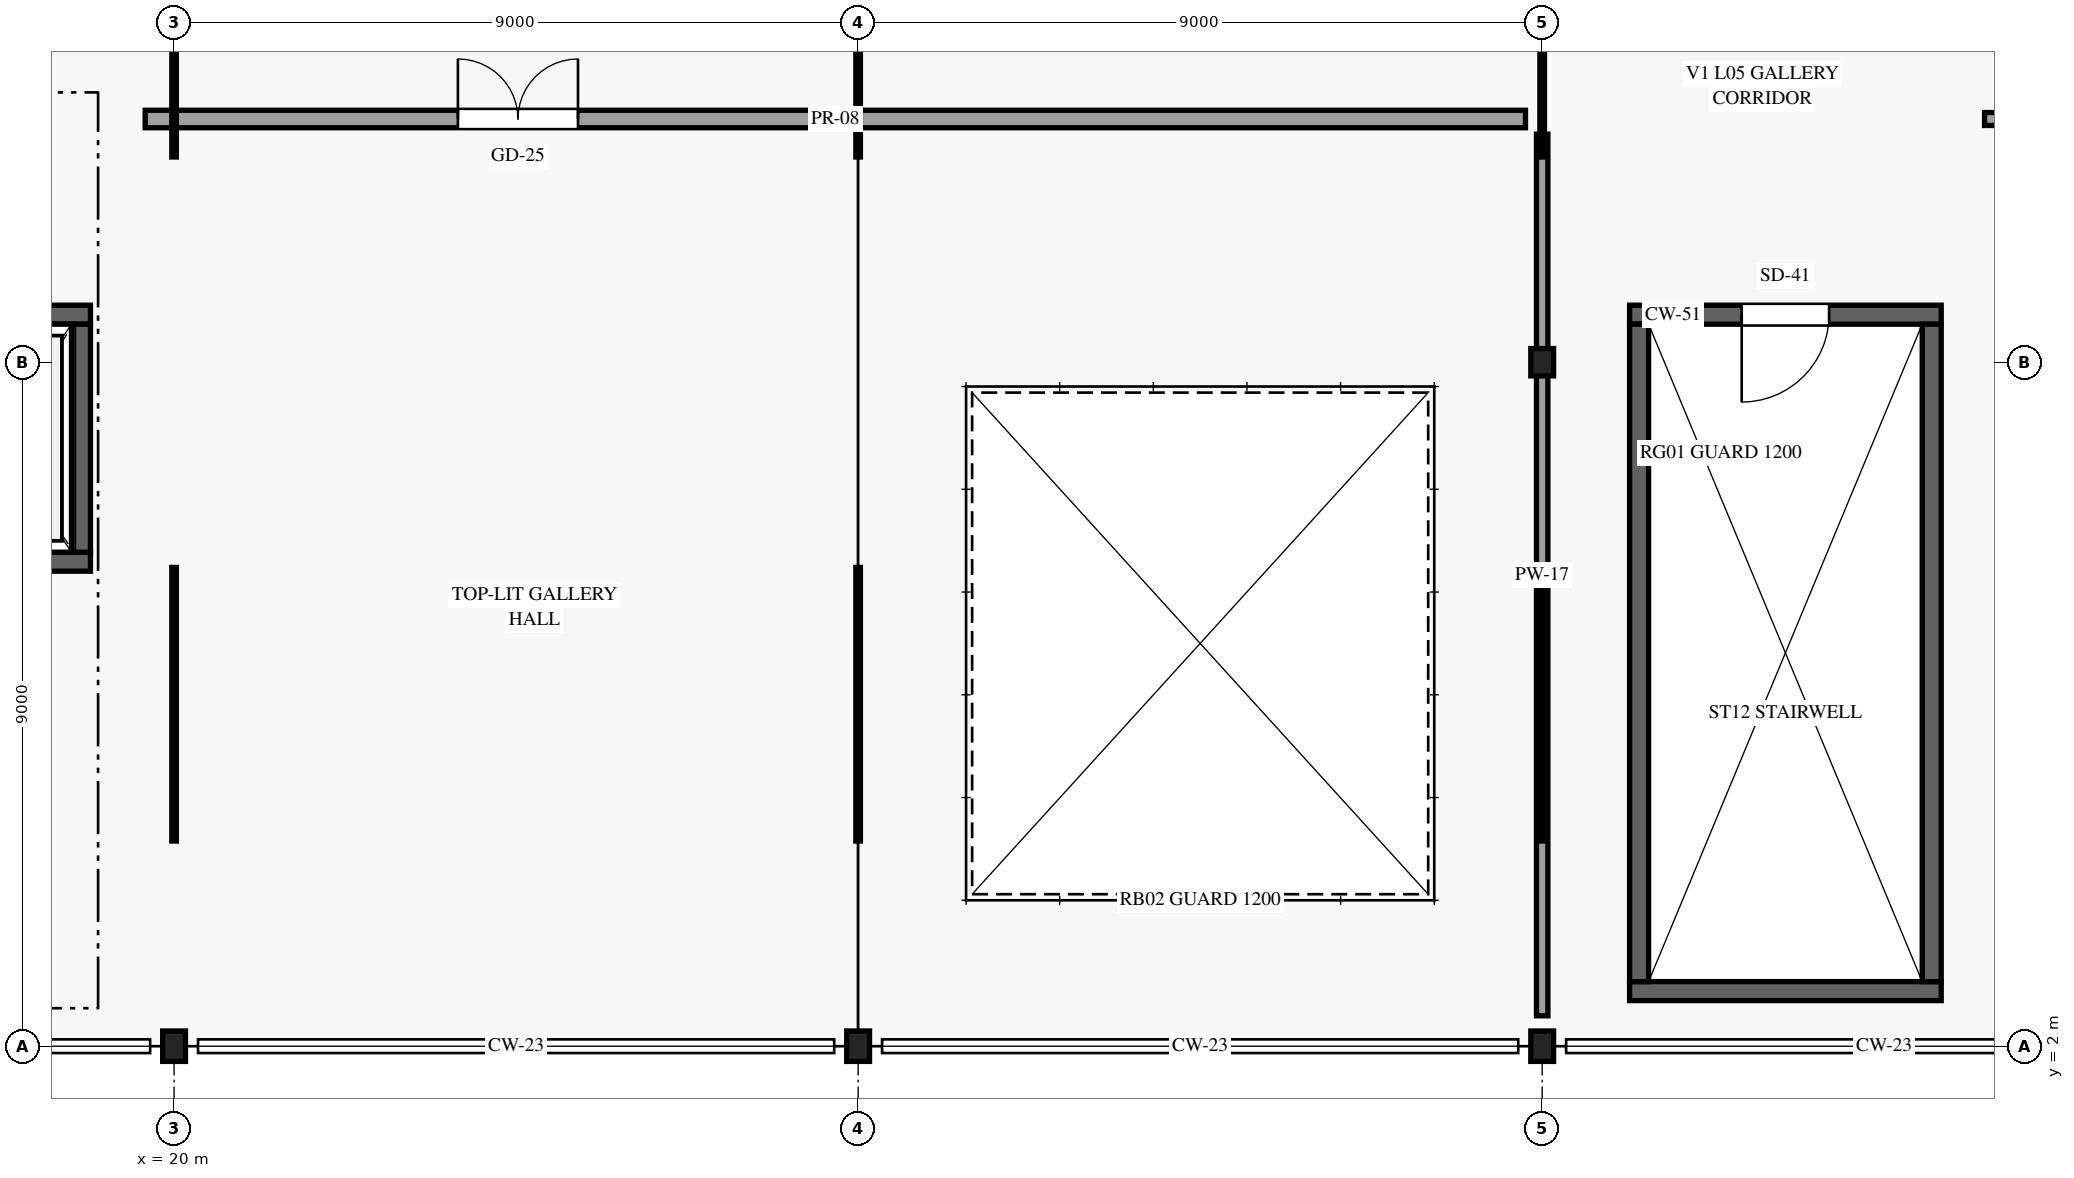
"""IFC4 building model, lengths in metres.
Left out: names, types, materials, properties, quantities, classifications, styles, units other than length and angle.
Written with IfcOpenShell. Run it as: python <this file> out.ifc"""

import sys

from ifc_helpers import new_model, si_unit, direction, frame, frame_2d, origin, origin_2d, place, context, subcontext, project, spatial, rectangle, i_section, extrude, element, fill, save


model = new_model("IFC4")
c1 = context("Model", 3, precision=1e-05, world=origin(), true_north=direction((0.0, 1.0)))
c2 = subcontext(c1, "Body", "Model", "MODEL_VIEW")
j1 = project(units=[si_unit("LENGTHUNIT", "METRE"), si_unit("PLANEANGLEUNIT", "RADIAN")], contexts=[c1])
p1 = place(None, origin())
s1 = spatial("IfcSite", under=j1, at=p1, CompositionType="ELEMENT")
p2 = place(p1, origin())
s2 = spatial("IfcBuilding", under=s1, at=p2, CompositionType="ELEMENT")
p3 = place(p2, frame((0.0, 0.0, 24.0)))
s3 = spatial("IfcBuildingStorey", under=s2, at=p3, CompositionType="ELEMENT", Elevation=24.0)
for number, where, z_axis, x_axis in (
    (1, (20.0, 2.0, 0.0), (0.0, 0.0, 1.0), (1.0, 0.0, 0.0)),
    (2, (29.0, 2.0, 0.0), (0.0, 0.0, 1.0), (1.0, 0.0, 0.0)),
    (3, (38.0, 2.0, 0.0), (0.0, 0.0, 1.0), (1.0, 0.0, 0.0)),
):
    element("IfcColumn", number, at=place(p3, frame(where, z_axis=z_axis, x_axis=x_axis)), inside=s3, PredefinedType="COLUMN", context=c2, shape_type="SweptSolid", body=[
        extrude(i_section(OverallWidth=0.3, OverallDepth=0.4, WebThickness=0.013, FlangeThickness=0.024, FilletRadius=0.027, at=origin_2d()), origin(), (0.0, 0.0, 1.0), 4.8),
    ])
p4 = place(p3, frame((38.0, 11.0, 0.0), z_axis=(0.0, 0.0, 1.0), x_axis=(1.0, 0.0, 0.0)))
e4 = element("IfcColumn", 4, at=p4, inside=s3, PredefinedType="COLUMN", context=c2, shape_type="SweptSolid", body=[
    extrude(i_section(OverallWidth=0.3, OverallDepth=0.36, WebThickness=0.012, FlangeThickness=0.022, FilletRadius=0.027, at=origin_2d()), origin(), (0.0, 0.0, 1.0), 4.8),
])
p5 = place(p3, frame((16.4, 11.625, 0.0), z_axis=(0.0, 0.0, 1.0), x_axis=(1.0, 0.0, 0.0)))
e5 = element("IfcWall", 5, at=p5, inside=s3, PredefinedType="SHEAR", context=c2, shape_type="SweptSolid", body=[
    extrude(rectangle(XDim=2.5, YDim=0.25, at=frame_2d((1.25, 0.0))), origin(), (0.0, 0.0, 1.0), 4.48),
])
p6 = place(p5, frame((0.7, 0.0, 0.0)))
e6 = element("IfcOpeningElement", 6, at=p6, cuts=e5, PredefinedType="OPENING", context=c2, shape_type="SweptSolid", body=[
    extrude(rectangle(XDim=1.1, YDim=2.2, at=frame_2d((0.55, 1.1))), frame((0.0, 0.135, 0.0), z_axis=(0.0, -1.0, 0.0), x_axis=(1.0, 0.0, 0.0)), (0.0, 0.0, 1.0), 0.27),
])
p7 = place(p3, frame((16.4, 8.375, 0.0), z_axis=(0.0, 0.0, 1.0), x_axis=(1.0, 0.0, 0.0)))
e7 = element("IfcWall", 7, at=p7, inside=s3, PredefinedType="SHEAR", context=c2, shape_type="SweptSolid", body=[
    extrude(rectangle(XDim=2.5, YDim=0.25, at=frame_2d((1.25, 0.0))), origin(), (0.0, 0.0, 1.0), 4.48),
])
p8 = place(p3, frame((18.775, 8.5, 0.0), z_axis=(0.0, 0.0, 1.0), x_axis=(0.0, 1.0, 0.0)))
e8 = element("IfcWall", 8, at=p8, inside=s3, PredefinedType="SHEAR", context=c2, shape_type="SweptSolid", body=[
    extrude(rectangle(XDim=3.0, YDim=0.25, at=frame_2d((1.5, 0.0))), origin(), (0.0, 0.0, 1.0), 4.48),
])
p9 = place(p3, frame((39.15, 11.625, 0.0), z_axis=(0.0, 0.0, 1.0), x_axis=(1.0, 0.0, 0.0)))
e9 = element("IfcWall", 9, at=p9, inside=s3, PredefinedType="SHEAR", context=c2, shape_type="SweptSolid", body=[
    extrude(rectangle(XDim=4.1, YDim=0.25, at=frame_2d((2.05, 0.0))), origin(), (0.0, 0.0, 1.0), 4.48),
])
p10 = place(p9, frame((2.625, 0.0, 0.0), z_axis=(0.0, 0.0, 1.0), x_axis=(-1.0, 0.0, 0.0)))
e10 = element("IfcOpeningElement", 10, at=p10, cuts=e9, PredefinedType="OPENING", context=c2, shape_type="SweptSolid", body=[
    extrude(rectangle(XDim=1.15, YDim=2.2, at=frame_2d((0.575, 1.1))), frame((0.0, 0.135, 0.0), z_axis=(0.0, -1.0, 0.0), x_axis=(1.0, 0.0, 0.0)), (0.0, 0.0, 1.0), 0.27),
])
p11 = place(p3, frame((39.15, 2.725, 0.0), z_axis=(0.0, 0.0, 1.0), x_axis=(1.0, 0.0, 0.0)))
e11 = element("IfcWall", 11, at=p11, inside=s3, PredefinedType="SHEAR", context=c2, shape_type="SweptSolid", body=[
    extrude(rectangle(XDim=4.1, YDim=0.25, at=frame_2d((2.05, 0.0))), origin(), (0.0, 0.0, 1.0), 4.48),
])
for number, where, z_axis, x_axis in (
    (12, (39.275, 2.85, 0.0), (0.0, 0.0, 1.0), (0.0, 1.0, 0.0)),
    (13, (43.125, 2.85, 0.0), (0.0, 0.0, 1.0), (0.0, 1.0, 0.0)),
):
    element("IfcWall", number, at=place(p3, frame(where, z_axis=z_axis, x_axis=x_axis)), inside=s3, PredefinedType="SHEAR", context=c2, shape_type="SweptSolid", body=[
        extrude(rectangle(XDim=8.65, YDim=0.25, at=frame_2d((4.325, 0.0))), origin(), (0.0, 0.0, 1.0), 4.48),
    ])
p12 = place(p3, frame((19.62, 14.2, 0.0), z_axis=(0.0, 0.0, 1.0), x_axis=(1.0, 0.0, 0.0)))
e14 = element("IfcWall", 14, at=p12, inside=s3, PredefinedType="PARTITIONING", context=c2, shape_type="SweptSolid", body=[
    extrude(rectangle(XDim=18.16, YDim=0.23, at=frame_2d((9.08, 0.0))), origin(), (0.0, 0.0, 1.0), 2.665),
])
p13 = place(p12, frame((4.114, 0.0, 0.0)))
e15 = element("IfcOpeningElement", 15, at=p13, cuts=e14, PredefinedType="OPENING", context=c2, shape_type="SweptSolid", body=[
    extrude(rectangle(XDim=1.58, YDim=2.38, at=frame_2d((0.79, 1.19))), frame((0.0, 0.125, 0.0), z_axis=(0.0, -1.0, 0.0), x_axis=(1.0, 0.0, 0.0)), (0.0, 0.0, 1.0), 0.25),
])
p14 = place(p3, frame((38.0, 2.4, 0.0), z_axis=(0.0, 0.0, 1.0), x_axis=(0.0, 1.0, 0.0)))
e16 = element("IfcWall", 16, at=p14, inside=s3, PredefinedType="PARTITIONING", context=c2, shape_type="SweptSolid", body=[
    extrude(rectangle(XDim=11.6, YDim=0.15, at=frame_2d((5.8, 0.0))), origin(), (0.0, 0.0, 1.0), 2.665),
])
p15 = place(p3, frame((43.82, 14.2, 0.0), z_axis=(0.0, 0.0, 1.0), x_axis=(1.0, 0.0, 0.0)))
e17 = element("IfcWall", 17, at=p15, inside=s3, PredefinedType="PARTITIONING", context=c2, shape_type="SweptSolid", body=[
    extrude(rectangle(XDim=11.96, YDim=0.17, at=frame_2d((5.98, 0.0))), origin(), (0.0, 0.0, 1.0), 2.665),
])
p16 = place(p15, frame((7.207, 0.0, 0.0)))
e18 = element("IfcOpeningElement", 18, at=p16, cuts=e17, PredefinedType="OPENING", context=c2, shape_type="SweptSolid", body=[
    extrude(rectangle(XDim=1.16, YDim=2.28, at=frame_2d((0.58, 1.14))), frame((0.0, 0.095, 0.0), z_axis=(0.0, -1.0, 0.0), x_axis=(1.0, 0.0, 0.0)), (0.0, 0.0, 1.0), 0.19),
])
p17 = place(p10, origin())
e19 = element("IfcDoor", 19, at=p17, inside=s3, OperationType="SINGLE_SWING_RIGHT", PredefinedType="DOOR", context=c2, shape_type="SweptSolid", body=[
    extrude(rectangle(XDim=1.15, YDim=2.2, at=frame_2d((0.575, 1.1))), frame((0.0, 0.025, 0.0), z_axis=(0.0, -1.0, 0.0), x_axis=(1.0, 0.0, 0.0)), (0.0, 0.0, 1.0), 0.05),
])
fill(e10, e19)
p18 = place(p13, origin())
e20 = element("IfcDoor", 20, at=p18, inside=s3, OperationType="DOUBLE_DOOR_SINGLE_SWING", PredefinedType="DOOR", context=c2, shape_type="SweptSolid", body=[
    extrude(rectangle(XDim=1.58, YDim=2.38, at=frame_2d((0.79, 1.19))), frame((0.0, 0.025, 0.0), z_axis=(0.0, -1.0, 0.0), x_axis=(1.0, 0.0, 0.0)), (0.0, 0.0, 1.0), 0.05),
])
fill(e15, e20)
save(model, sys.argv[1])
